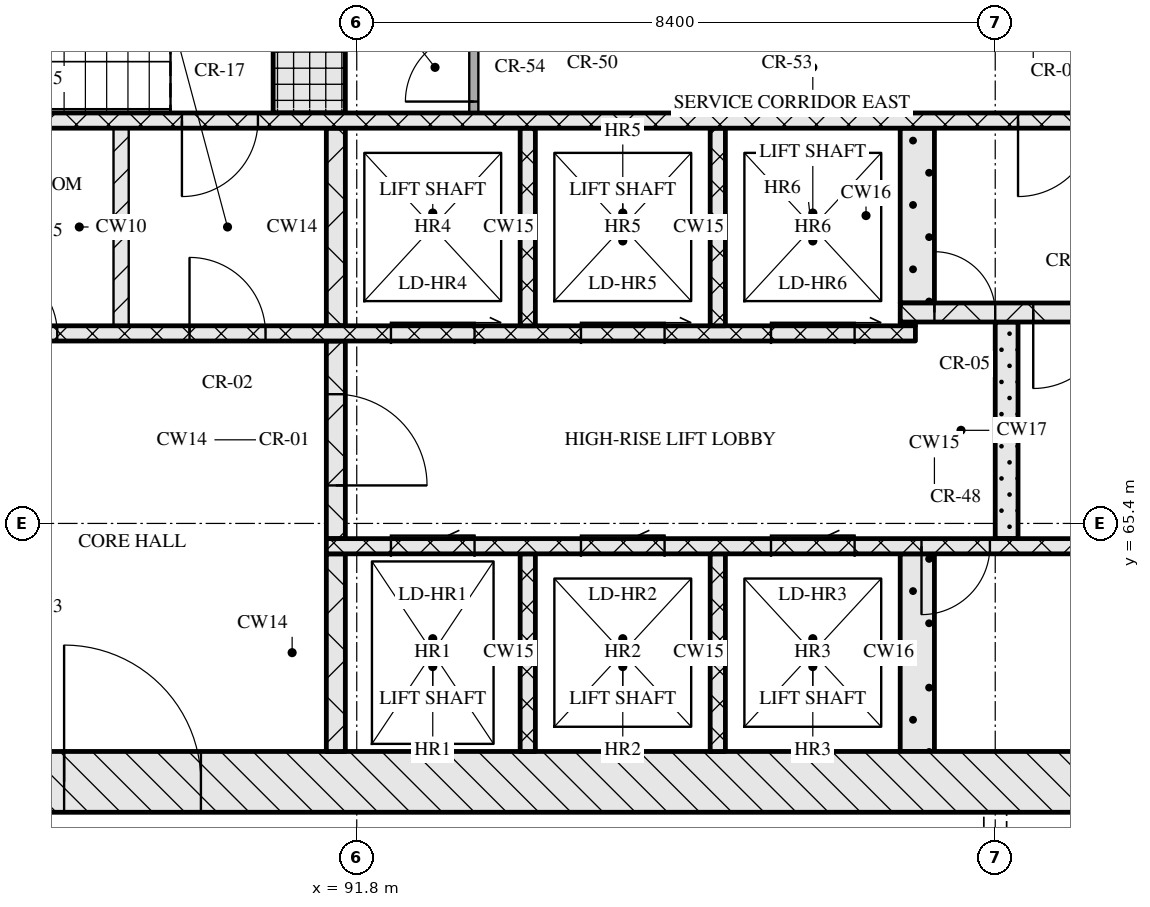
"""IFC4 building model, lengths in metres.
Left out: names, types, materials, properties, quantities, classifications, styles, units other than length and angle.
Written with IfcOpenShell. Run it as: python <this file> out.ifc"""

import sys

from ifc_helpers import new_model, si_unit, direction, frame, frame_2d, origin, place, context, subcontext, project, spatial, rectangle, extrude, element, fill, save


model = new_model("IFC4")
c1 = context("Model", 3, precision=1e-05, world=origin(), true_north=direction((0.0, 1.0)))
c2 = subcontext(c1, "Body", "Model", "MODEL_VIEW")
j1 = project(units=[si_unit("LENGTHUNIT", "METRE"), si_unit("PLANEANGLEUNIT", "RADIAN")], contexts=[c1])
p1 = place(None, origin())
s1 = spatial("IfcSite", under=j1, at=p1, CompositionType="ELEMENT")
p2 = place(p1, origin())
s2 = spatial("IfcBuilding", under=s1, at=p2, CompositionType="ELEMENT")
p3 = place(p2, frame((0.0, 0.0, 151.05)))
s3 = spatial("IfcBuildingStorey", under=s2, at=p3, CompositionType="ELEMENT", Elevation=151.05)
p4 = place(p3, frame((67.0, 62.0, 0.0), z_axis=(0.0, 0.0, 1.0), x_axis=(1.0, 0.0, 0.0)))
e1 = element("IfcWall", 1, at=p4, inside=s3, PredefinedType="SOLIDWALL", context=c2, shape_type="SweptSolid", body=[
    extrude(rectangle(XDim=41.2, YDim=0.8, at=frame_2d((20.6, 0.0))), origin(), (0.0, 0.0, 1.0), 3.32),
])
p5 = place(p4, frame((20.95, 0.0, 0.0)))
e2 = element("IfcOpeningElement", 2, at=p5, cuts=e1, PredefinedType="OPENING", context=c2, shape_type="SweptSolid", body=[
    extrude(rectangle(XDim=1.8, YDim=2.1, at=frame_2d((0.9, 1.05))), frame((0.0, 0.41, 0.0), z_axis=(0.0, -1.0, 0.0), x_axis=(1.0, 0.0, 0.0)), (0.0, 0.0, 1.0), 0.82),
])
p6 = place(p3, frame((91.525, 62.4, 0.0), z_axis=(0.0, 0.0, 1.0), x_axis=(0.0, 1.0, 0.0)))
e3 = element("IfcWall", 3, at=p6, inside=s3, PredefinedType="SOLIDWALL", context=c2, shape_type="SweptSolid", body=[
    extrude(rectangle(XDim=2.6, YDim=0.25, at=frame_2d((1.3, 0.0))), origin(), (0.0, 0.0, 1.0), 3.32),
])
for number, where, z_axis, x_axis in (
    (4, (94.05, 62.4, 0.0), (0.0, 0.0, 1.0), (0.0, 1.0, 0.0)),
    (5, (96.55, 62.4, 0.0), (0.0, 0.0, 1.0), (0.0, 1.0, 0.0)),
):
    element("IfcWall", number, at=place(p3, frame(where, z_axis=z_axis, x_axis=x_axis)), inside=s3, PredefinedType="SOLIDWALL", context=c2, shape_type="SweptSolid", body=[
        extrude(rectangle(XDim=2.6, YDim=0.2, at=frame_2d((1.3, 0.0))), origin(), (0.0, 0.0, 1.0), 3.32),
    ])
p7 = place(p3, frame((99.175, 62.4, 0.0), z_axis=(0.0, 0.0, 1.0), x_axis=(0.0, 1.0, 0.0)))
e6 = element("IfcWall", 6, at=p7, inside=s3, PredefinedType="SOLIDWALL", context=c2, shape_type="SweptSolid", body=[
    extrude(rectangle(XDim=2.6, YDim=0.45, at=frame_2d((1.3, 0.0))), origin(), (0.0, 0.0, 1.0), 3.32),
])
p8 = place(p3, frame((91.4, 65.1, 0.0), z_axis=(0.0, 0.0, 1.0), x_axis=(1.0, 0.0, 0.0)))
e7 = element("IfcWall", 7, at=p8, inside=s3, PredefinedType="SOLIDWALL", context=c2, shape_type="SweptSolid", body=[
    extrude(rectangle(XDim=16.0, YDim=0.2, at=frame_2d((8.0, 0.0))), origin(), (0.0, 0.0, 1.0), 3.32),
])
p9 = place(p8, frame((0.85, 0.0, 0.0)))
e8 = element("IfcOpeningElement", 8, at=p9, cuts=e7, PredefinedType="OPENING", context=c2, shape_type="SweptSolid", body=[
    extrude(rectangle(XDim=1.1, YDim=2.1, at=frame_2d((0.55, 1.05))), frame((0.0, 0.11, 0.0), z_axis=(0.0, -1.0, 0.0), x_axis=(1.0, 0.0, 0.0)), (0.0, 0.0, 1.0), 0.22),
])
p10 = place(p8, frame((3.35, 0.0, 0.0)))
e9 = element("IfcOpeningElement", 9, at=p10, cuts=e7, PredefinedType="OPENING", context=c2, shape_type="SweptSolid", body=[
    extrude(rectangle(XDim=1.1, YDim=2.1, at=frame_2d((0.55, 1.05))), frame((0.0, 0.11, 0.0), z_axis=(0.0, -1.0, 0.0), x_axis=(1.0, 0.0, 0.0)), (0.0, 0.0, 1.0), 0.22),
])
p11 = place(p8, frame((5.85, 0.0, 0.0)))
e10 = element("IfcOpeningElement", 10, at=p11, cuts=e7, PredefinedType="OPENING", context=c2, shape_type="SweptSolid", body=[
    extrude(rectangle(XDim=1.1, YDim=2.1, at=frame_2d((0.55, 1.05))), frame((0.0, 0.11, 0.0), z_axis=(0.0, -1.0, 0.0), x_axis=(1.0, 0.0, 0.0)), (0.0, 0.0, 1.0), 0.22),
])
p12 = place(p8, frame((7.83, 0.0, 0.0)))
e11 = element("IfcOpeningElement", 11, at=p12, cuts=e7, PredefinedType="OPENING", context=c2, shape_type="SweptSolid", body=[
    extrude(rectangle(XDim=0.9, YDim=2.1, at=frame_2d((0.45, 1.05))), frame((0.0, 0.11, 0.0), z_axis=(0.0, -1.0, 0.0), x_axis=(1.0, 0.0, 0.0)), (0.0, 0.0, 1.0), 0.22),
])
p13 = place(p3, frame((91.525, 65.2, 0.0), z_axis=(0.0, 0.0, 1.0), x_axis=(0.0, 1.0, 0.0)))
e12 = element("IfcWall", 12, at=p13, inside=s3, PredefinedType="SOLIDWALL", context=c2, shape_type="SweptSolid", body=[
    extrude(rectangle(XDim=2.6, YDim=0.25, at=frame_2d((1.3, 0.0))), origin(), (0.0, 0.0, 1.0), 3.32),
])
p14 = place(p13, frame((0.7, 0.0, 0.0)))
e13 = element("IfcOpeningElement", 13, at=p14, cuts=e12, PredefinedType="OPENING", context=c2, shape_type="SweptSolid", body=[
    extrude(rectangle(XDim=1.2, YDim=2.1, at=frame_2d((0.6, 1.05))), frame((0.0, 0.135, 0.0), z_axis=(0.0, -1.0, 0.0), x_axis=(1.0, 0.0, 0.0)), (0.0, 0.0, 1.0), 0.27),
])
p15 = place(p3, frame((100.35, 65.2, 0.0), z_axis=(0.0, 0.0, 1.0), x_axis=(0.0, 1.0, 0.0)))
e14 = element("IfcWall", 14, at=p15, inside=s3, PredefinedType="SOLIDWALL", context=c2, shape_type="SweptSolid", body=[
    extrude(rectangle(XDim=2.85, YDim=0.3, at=frame_2d((1.425, 0.0))), origin(), (0.0, 0.0, 1.0), 3.32),
])
p16 = place(p3, frame((76.05, 67.9, 0.0), z_axis=(0.0, 0.0, 1.0), x_axis=(1.0, 0.0, 0.0)))
e15 = element("IfcWall", 15, at=p16, inside=s3, PredefinedType="SOLIDWALL", context=c2, shape_type="SweptSolid", body=[
    extrude(rectangle(XDim=23.1, YDim=0.2, at=frame_2d((11.55, 0.0))), origin(), (0.0, 0.0, 1.0), 3.32),
])
p17 = place(p16, frame((1.4, 0.0, 0.0)))
e16 = element("IfcOpeningElement", 16, at=p17, cuts=e15, PredefinedType="OPENING", context=c2, shape_type="SweptSolid", body=[
    extrude(rectangle(XDim=0.9, YDim=2.1, at=frame_2d((0.45, 1.05))), frame((0.0, 0.11, 0.0), z_axis=(0.0, -1.0, 0.0), x_axis=(1.0, 0.0, 0.0)), (0.0, 0.0, 1.0), 0.22),
])
p18 = place(p16, frame((5.11, 0.0, 0.0)))
e17 = element("IfcOpeningElement", 17, at=p18, cuts=e15, PredefinedType="OPENING", context=c2, shape_type="SweptSolid", body=[
    extrude(rectangle(XDim=0.9, YDim=2.1, at=frame_2d((0.45, 1.05))), frame((0.0, 0.11, 0.0), z_axis=(0.0, -1.0, 0.0), x_axis=(1.0, 0.0, 0.0)), (0.0, 0.0, 1.0), 0.22),
])
p19 = place(p16, frame((8.45, 0.0, 0.0)))
e18 = element("IfcOpeningElement", 18, at=p19, cuts=e15, PredefinedType="OPENING", context=c2, shape_type="SweptSolid", body=[
    extrude(rectangle(XDim=0.9, YDim=2.1, at=frame_2d((0.45, 1.05))), frame((0.0, 0.11, 0.0), z_axis=(0.0, -1.0, 0.0), x_axis=(1.0, 0.0, 0.0)), (0.0, 0.0, 1.0), 0.22),
])
p20 = place(p16, frame((10.91, 0.0, 0.0)))
e19 = element("IfcOpeningElement", 19, at=p20, cuts=e15, PredefinedType="OPENING", context=c2, shape_type="SweptSolid", body=[
    extrude(rectangle(XDim=0.9, YDim=2.1, at=frame_2d((0.45, 1.05))), frame((0.0, 0.11, 0.0), z_axis=(0.0, -1.0, 0.0), x_axis=(1.0, 0.0, 0.0)), (0.0, 0.0, 1.0), 0.22),
])
p21 = place(p16, frame((13.55, 0.0, 0.0)))
e20 = element("IfcOpeningElement", 20, at=p21, cuts=e15, PredefinedType="OPENING", context=c2, shape_type="SweptSolid", body=[
    extrude(rectangle(XDim=1.0, YDim=2.1, at=frame_2d((0.5, 1.05))), frame((0.0, 0.11, 0.0), z_axis=(0.0, -1.0, 0.0), x_axis=(1.0, 0.0, 0.0)), (0.0, 0.0, 1.0), 0.22),
])
p22 = place(p16, frame((16.2, 0.0, 0.0)))
e21 = element("IfcOpeningElement", 21, at=p22, cuts=e15, PredefinedType="OPENING", context=c2, shape_type="SweptSolid", body=[
    extrude(rectangle(XDim=1.1, YDim=2.1, at=frame_2d((0.55, 1.05))), frame((0.0, 0.11, 0.0), z_axis=(0.0, -1.0, 0.0), x_axis=(1.0, 0.0, 0.0)), (0.0, 0.0, 1.0), 0.22),
])
p23 = place(p16, frame((18.7, 0.0, 0.0)))
e22 = element("IfcOpeningElement", 22, at=p23, cuts=e15, PredefinedType="OPENING", context=c2, shape_type="SweptSolid", body=[
    extrude(rectangle(XDim=1.1, YDim=2.1, at=frame_2d((0.55, 1.05))), frame((0.0, 0.11, 0.0), z_axis=(0.0, -1.0, 0.0), x_axis=(1.0, 0.0, 0.0)), (0.0, 0.0, 1.0), 0.22),
])
p24 = place(p16, frame((21.2, 0.0, 0.0)))
e23 = element("IfcOpeningElement", 23, at=p24, cuts=e15, PredefinedType="OPENING", context=c2, shape_type="SweptSolid", body=[
    extrude(rectangle(XDim=1.1, YDim=2.1, at=frame_2d((0.55, 1.05))), frame((0.0, 0.11, 0.0), z_axis=(0.0, -1.0, 0.0), x_axis=(1.0, 0.0, 0.0)), (0.0, 0.0, 1.0), 0.22),
])
p25 = place(p3, frame((88.7, 68.0, 0.0), z_axis=(0.0, 0.0, 1.0), x_axis=(0.0, 1.0, 0.0)))
e24 = element("IfcWall", 24, at=p25, inside=s3, PredefinedType="PARTITIONING", context=c2, shape_type="SweptSolid", body=[
    extrude(rectangle(XDim=2.6, YDim=0.2, at=frame_2d((1.3, 0.0))), origin(), (0.0, 0.0, 1.0), 3.32),
])
p26 = place(p3, frame((91.525, 68.0, 0.0), z_axis=(0.0, 0.0, 1.0), x_axis=(0.0, 1.0, 0.0)))
e25 = element("IfcWall", 25, at=p26, inside=s3, PredefinedType="SOLIDWALL", context=c2, shape_type="SweptSolid", body=[
    extrude(rectangle(XDim=2.6, YDim=0.25, at=frame_2d((1.3, 0.0))), origin(), (0.0, 0.0, 1.0), 3.32),
])
for number, where, z_axis, x_axis in (
    (26, (94.05, 68.0, 0.0), (0.0, 0.0, 1.0), (0.0, 1.0, 0.0)),
    (27, (96.55, 68.0, 0.0), (0.0, 0.0, 1.0), (0.0, 1.0, 0.0)),
):
    element("IfcWall", number, at=place(p3, frame(where, z_axis=z_axis, x_axis=x_axis)), inside=s3, PredefinedType="SOLIDWALL", context=c2, shape_type="SweptSolid", body=[
        extrude(rectangle(XDim=2.6, YDim=0.2, at=frame_2d((1.3, 0.0))), origin(), (0.0, 0.0, 1.0), 3.32),
    ])
p27 = place(p3, frame((98.95, 68.025, 0.0), z_axis=(0.0, 0.0, 1.0), x_axis=(1.0, 0.0, 0.0)))
e28 = element("IfcWall", 28, at=p27, inside=s3, PredefinedType="SOLIDWALL", context=c2, shape_type="SweptSolid", body=[
    extrude(rectangle(XDim=0.2, YDim=0.05, at=frame_2d((0.1, 0.0))), origin(), (0.0, 0.0, 1.0), 3.32),
])
p28 = place(p3, frame((98.95, 68.175, 0.0), z_axis=(0.0, 0.0, 1.0), x_axis=(1.0, 0.0, 0.0)))
e29 = element("IfcWall", 29, at=p28, inside=s3, PredefinedType="SOLIDWALL", context=c2, shape_type="SweptSolid", body=[
    extrude(rectangle(XDim=8.45, YDim=0.25, at=frame_2d((4.225, 0.0))), origin(), (0.0, 0.0, 1.0), 3.32),
])
p29 = place(p28, frame((0.45, 0.0, 0.0)))
e30 = element("IfcOpeningElement", 30, at=p29, cuts=e29, PredefinedType="OPENING", context=c2, shape_type="SweptSolid", body=[
    extrude(rectangle(XDim=0.8, YDim=2.1, at=frame_2d((0.4, 1.05))), frame((0.0, 0.135, 0.0), z_axis=(0.0, -1.0, 0.0), x_axis=(1.0, 0.0, 0.0)), (0.0, 0.0, 1.0), 0.27),
])
p30 = place(p28, frame((1.75, 0.0, 0.0)))
e31 = element("IfcOpeningElement", 31, at=p30, cuts=e29, PredefinedType="OPENING", context=c2, shape_type="SweptSolid", body=[
    extrude(rectangle(XDim=1.0, YDim=2.1, at=frame_2d((0.5, 1.05))), frame((0.0, 0.135, 0.0), z_axis=(0.0, -1.0, 0.0), x_axis=(1.0, 0.0, 0.0)), (0.0, 0.0, 1.0), 0.27),
])
p31 = place(p3, frame((99.175, 68.3, 0.0), z_axis=(0.0, 0.0, 1.0), x_axis=(0.0, 1.0, 0.0)))
e32 = element("IfcWall", 32, at=p31, inside=s3, PredefinedType="SOLIDWALL", context=c2, shape_type="SweptSolid", body=[
    extrude(rectangle(XDim=2.3, YDim=0.45, at=frame_2d((1.15, 0.0))), origin(), (0.0, 0.0, 1.0), 3.32),
])
p32 = place(p3, frame((67.8, 70.7, 0.0), z_axis=(0.0, 0.0, 1.0), x_axis=(1.0, 0.0, 0.0)))
e33 = element("IfcWall", 33, at=p32, inside=s3, PredefinedType="SOLIDWALL", context=c2, shape_type="SweptSolid", body=[
    extrude(rectangle(XDim=39.6, YDim=0.2, at=frame_2d((19.8, 0.0))), origin(), (0.0, 0.0, 1.0), 3.32),
])
p33 = place(p32, frame((0.65, 0.0, 0.0)))
e34 = element("IfcOpeningElement", 34, at=p33, cuts=e33, PredefinedType="OPENING", context=c2, shape_type="SweptSolid", body=[
    extrude(rectangle(XDim=1.1, YDim=2.1, at=frame_2d((0.55, 1.05))), frame((0.0, 0.11, 0.0), z_axis=(0.0, -1.0, 0.0), x_axis=(1.0, 0.0, 0.0)), (0.0, 0.0, 1.0), 0.22),
])
p34 = place(p32, frame((3.25, 0.0, 0.0)))
e35 = element("IfcOpeningElement", 35, at=p34, cuts=e33, PredefinedType="OPENING", context=c2, shape_type="SweptSolid", body=[
    extrude(rectangle(XDim=1.1, YDim=2.1, at=frame_2d((0.55, 1.05))), frame((0.0, 0.11, 0.0), z_axis=(0.0, -1.0, 0.0), x_axis=(1.0, 0.0, 0.0)), (0.0, 0.0, 1.0), 0.22),
])
p35 = place(p32, frame((5.9, 0.0, 0.0)))
e36 = element("IfcOpeningElement", 36, at=p35, cuts=e33, PredefinedType="OPENING", context=c2, shape_type="SweptSolid", body=[
    extrude(rectangle(XDim=1.0, YDim=2.1, at=frame_2d((0.5, 1.05))), frame((0.0, 0.11, 0.0), z_axis=(0.0, -1.0, 0.0), x_axis=(1.0, 0.0, 0.0)), (0.0, 0.0, 1.0), 0.22),
])
p36 = place(p32, frame((21.7, 0.0, 0.0)))
e37 = element("IfcOpeningElement", 37, at=p36, cuts=e33, PredefinedType="OPENING", context=c2, shape_type="SweptSolid", body=[
    extrude(rectangle(XDim=1.0, YDim=2.1, at=frame_2d((0.5, 1.05))), frame((0.0, 0.11, 0.0), z_axis=(0.0, -1.0, 0.0), x_axis=(1.0, 0.0, 0.0)), (0.0, 0.0, 1.0), 0.22),
])
p37 = place(p32, frame((32.7, 0.0, 0.0)))
e38 = element("IfcOpeningElement", 38, at=p37, cuts=e33, PredefinedType="OPENING", context=c2, shape_type="SweptSolid", body=[
    extrude(rectangle(XDim=1.0, YDim=2.1, at=frame_2d((0.5, 1.05))), frame((0.0, 0.11, 0.0), z_axis=(0.0, -1.0, 0.0), x_axis=(1.0, 0.0, 0.0)), (0.0, 0.0, 1.0), 0.22),
])
p38 = place(p32, frame((35.25, 0.0, 0.0)))
e39 = element("IfcOpeningElement", 39, at=p38, cuts=e33, PredefinedType="OPENING", context=c2, shape_type="SweptSolid", body=[
    extrude(rectangle(XDim=1.1, YDim=2.1, at=frame_2d((0.55, 1.05))), frame((0.0, 0.11, 0.0), z_axis=(0.0, -1.0, 0.0), x_axis=(1.0, 0.0, 0.0)), (0.0, 0.0, 1.0), 0.22),
])
p39 = place(p32, frame((37.85, 0.0, 0.0)))
e40 = element("IfcOpeningElement", 40, at=p39, cuts=e33, PredefinedType="OPENING", context=c2, shape_type="SweptSolid", body=[
    extrude(rectangle(XDim=1.1, YDim=2.1, at=frame_2d((0.55, 1.05))), frame((0.0, 0.11, 0.0), z_axis=(0.0, -1.0, 0.0), x_axis=(1.0, 0.0, 0.0)), (0.0, 0.0, 1.0), 0.22),
])
p40 = place(p3, frame((91.175, 70.8, 0.0), z_axis=(0.0, 0.0, 1.0), x_axis=(0.0, 1.0, 0.0)))
e41 = element("IfcWall", 41, at=p40, inside=s3, PredefinedType="SOLIDWALL", context=c2, shape_type="SweptSolid", body=[
    extrude(rectangle(XDim=2.95, YDim=0.95, at=frame_2d((1.475, 0.0))), origin(), (0.0, 0.0, 1.0), 3.32),
])
p41 = place(p3, frame((93.34, 70.8, 0.0), z_axis=(0.0, 0.0, 1.0), x_axis=(0.0, 1.0, 0.0)))
e42 = element("IfcWall", 42, at=p41, inside=s3, PredefinedType="PARTITIONING", context=c2, shape_type="SweptSolid", body=[
    extrude(rectangle(XDim=1.2, YDim=0.12, at=frame_2d((0.6, 0.0))), origin(), (0.0, 0.0, 1.0), 3.32),
])
p42 = place(p41, frame((0.15, 0.0, 0.0)))
e43 = element("IfcOpeningElement", 43, at=p42, cuts=e42, PredefinedType="OPENING", context=c2, shape_type="SweptSolid", body=[
    extrude(rectangle(XDim=0.9, YDim=2.1, at=frame_2d((0.45, 1.05))), frame((0.0, 0.07, 0.0), z_axis=(0.0, -1.0, 0.0), x_axis=(1.0, 0.0, 0.0)), (0.0, 0.0, 1.0), 0.14),
])
p43 = place(p5, origin())
e44 = element("IfcDoor", 44, at=p43, inside=s3, OperationType="DOUBLE_DOOR_SINGLE_SWING", PredefinedType="DOOR", context=c2, shape_type="SweptSolid", body=[
    extrude(rectangle(XDim=1.8, YDim=2.1, at=frame_2d((0.9, 1.05))), frame((0.0, 0.025, 0.0), z_axis=(0.0, -1.0, 0.0), x_axis=(1.0, 0.0, 0.0)), (0.0, 0.0, 1.0), 0.05),
])
fill(e2, e44)
p44 = place(p9, origin())
e45 = element("IfcDoor", 45, at=p44, inside=s3, OperationType="SLIDING_TO_LEFT", PredefinedType="DOOR", context=c2, shape_type="SweptSolid", body=[
    extrude(rectangle(XDim=1.1, YDim=2.1, at=frame_2d((0.55, 1.05))), frame((0.0, 0.025, 0.0), z_axis=(0.0, -1.0, 0.0), x_axis=(1.0, 0.0, 0.0)), (0.0, 0.0, 1.0), 0.05),
])
fill(e8, e45)
p45 = place(p10, origin())
e46 = element("IfcDoor", 46, at=p45, inside=s3, OperationType="SLIDING_TO_LEFT", PredefinedType="DOOR", context=c2, shape_type="SweptSolid", body=[
    extrude(rectangle(XDim=1.1, YDim=2.1, at=frame_2d((0.55, 1.05))), frame((0.0, 0.025, 0.0), z_axis=(0.0, -1.0, 0.0), x_axis=(1.0, 0.0, 0.0)), (0.0, 0.0, 1.0), 0.05),
])
fill(e9, e46)
p46 = place(p11, origin())
e47 = element("IfcDoor", 47, at=p46, inside=s3, OperationType="SLIDING_TO_LEFT", PredefinedType="DOOR", context=c2, shape_type="SweptSolid", body=[
    extrude(rectangle(XDim=1.1, YDim=2.1, at=frame_2d((0.55, 1.05))), frame((0.0, 0.025, 0.0), z_axis=(0.0, -1.0, 0.0), x_axis=(1.0, 0.0, 0.0)), (0.0, 0.0, 1.0), 0.05),
])
fill(e10, e47)
p47 = place(p12, origin())
e48 = element("IfcDoor", 48, at=p47, inside=s3, OperationType="SINGLE_SWING_RIGHT", PredefinedType="DOOR", context=c2, shape_type="SweptSolid", body=[
    extrude(rectangle(XDim=0.9, YDim=2.1, at=frame_2d((0.45, 1.05))), frame((0.0, 0.025, 0.0), z_axis=(0.0, -1.0, 0.0), x_axis=(1.0, 0.0, 0.0)), (0.0, 0.0, 1.0), 0.05),
])
fill(e11, e48)
p48 = place(p14, origin())
e49 = element("IfcDoor", 49, at=p48, inside=s3, OperationType="SINGLE_SWING_RIGHT", PredefinedType="DOOR", context=c2, shape_type="SweptSolid", body=[
    extrude(rectangle(XDim=1.2, YDim=2.1, at=frame_2d((0.6, 1.05))), frame((0.0, 0.025, 0.0), z_axis=(0.0, -1.0, 0.0), x_axis=(1.0, 0.0, 0.0)), (0.0, 0.0, 1.0), 0.05),
])
fill(e13, e49)
p49 = place(p20, origin())
e50 = element("IfcDoor", 50, at=p49, inside=s3, OperationType="SINGLE_SWING_LEFT", PredefinedType="DOOR", context=c2, shape_type="SweptSolid", body=[
    extrude(rectangle(XDim=0.9, YDim=2.1, at=frame_2d((0.45, 1.05))), frame((0.0, 0.025, 0.0), z_axis=(0.0, -1.0, 0.0), x_axis=(1.0, 0.0, 0.0)), (0.0, 0.0, 1.0), 0.05),
])
fill(e19, e50)
p50 = place(p21, origin())
e51 = element("IfcDoor", 51, at=p50, inside=s3, OperationType="SINGLE_SWING_LEFT", PredefinedType="DOOR", context=c2, shape_type="SweptSolid", body=[
    extrude(rectangle(XDim=1.0, YDim=2.1, at=frame_2d((0.5, 1.05))), frame((0.0, 0.025, 0.0), z_axis=(0.0, -1.0, 0.0), x_axis=(1.0, 0.0, 0.0)), (0.0, 0.0, 1.0), 0.05),
])
fill(e20, e51)
p51 = place(p22, origin())
e52 = element("IfcDoor", 52, at=p51, inside=s3, OperationType="SLIDING_TO_RIGHT", PredefinedType="DOOR", context=c2, shape_type="SweptSolid", body=[
    extrude(rectangle(XDim=1.1, YDim=2.1, at=frame_2d((0.55, 1.05))), frame((0.0, 0.025, 0.0), z_axis=(0.0, -1.0, 0.0), x_axis=(1.0, 0.0, 0.0)), (0.0, 0.0, 1.0), 0.05),
])
fill(e21, e52)
p52 = place(p23, origin())
e53 = element("IfcDoor", 53, at=p52, inside=s3, OperationType="SLIDING_TO_RIGHT", PredefinedType="DOOR", context=c2, shape_type="SweptSolid", body=[
    extrude(rectangle(XDim=1.1, YDim=2.1, at=frame_2d((0.55, 1.05))), frame((0.0, 0.025, 0.0), z_axis=(0.0, -1.0, 0.0), x_axis=(1.0, 0.0, 0.0)), (0.0, 0.0, 1.0), 0.05),
])
fill(e22, e53)
p53 = place(p24, origin())
e54 = element("IfcDoor", 54, at=p53, inside=s3, OperationType="SLIDING_TO_RIGHT", PredefinedType="DOOR", context=c2, shape_type="SweptSolid", body=[
    extrude(rectangle(XDim=1.1, YDim=2.1, at=frame_2d((0.55, 1.05))), frame((0.0, 0.025, 0.0), z_axis=(0.0, -1.0, 0.0), x_axis=(1.0, 0.0, 0.0)), (0.0, 0.0, 1.0), 0.05),
])
fill(e23, e54)
p54 = place(p29, origin())
e55 = element("IfcDoor", 55, at=p54, inside=s3, OperationType="SINGLE_SWING_LEFT", PredefinedType="DOOR", context=c2, shape_type="SweptSolid", body=[
    extrude(rectangle(XDim=0.8, YDim=2.1, at=frame_2d((0.4, 1.05))), frame((0.0, 0.025, 0.0), z_axis=(0.0, -1.0, 0.0), x_axis=(1.0, 0.0, 0.0)), (0.0, 0.0, 1.0), 0.05),
])
fill(e30, e55)
p55 = place(p30, origin())
e56 = element("IfcDoor", 56, at=p55, inside=s3, OperationType="SINGLE_SWING_RIGHT", PredefinedType="DOOR", context=c2, shape_type="SweptSolid", body=[
    extrude(rectangle(XDim=1.0, YDim=2.1, at=frame_2d((0.5, 1.05))), frame((0.0, 0.025, 0.0), z_axis=(0.0, -1.0, 0.0), x_axis=(1.0, 0.0, 0.0)), (0.0, 0.0, 1.0), 0.05),
])
fill(e31, e56)
p56 = place(p36, origin())
e57 = element("IfcDoor", 57, at=p56, inside=s3, OperationType="SINGLE_SWING_RIGHT", PredefinedType="DOOR", context=c2, shape_type="SweptSolid", body=[
    extrude(rectangle(XDim=1.0, YDim=2.1, at=frame_2d((0.5, 1.05))), frame((0.0, 0.025, 0.0), z_axis=(0.0, -1.0, 0.0), x_axis=(1.0, 0.0, 0.0)), (0.0, 0.0, 1.0), 0.05),
])
fill(e37, e57)
p57 = place(p37, origin())
e58 = element("IfcDoor", 58, at=p57, inside=s3, OperationType="SINGLE_SWING_RIGHT", PredefinedType="DOOR", context=c2, shape_type="SweptSolid", body=[
    extrude(rectangle(XDim=1.0, YDim=2.1, at=frame_2d((0.5, 1.05))), frame((0.0, 0.025, 0.0), z_axis=(0.0, -1.0, 0.0), x_axis=(1.0, 0.0, 0.0)), (0.0, 0.0, 1.0), 0.05),
])
fill(e38, e58)
p58 = place(p42, origin())
e59 = element("IfcDoor", 59, at=p58, inside=s3, OperationType="SINGLE_SWING_LEFT", PredefinedType="DOOR", context=c2, shape_type="SweptSolid", body=[
    extrude(rectangle(XDim=0.9, YDim=2.1, at=frame_2d((0.45, 1.05))), frame((0.0, 0.025, 0.0), z_axis=(0.0, -1.0, 0.0), x_axis=(1.0, 0.0, 0.0)), (0.0, 0.0, 1.0), 0.05),
])
fill(e43, e59)
save(model, sys.argv[1])
